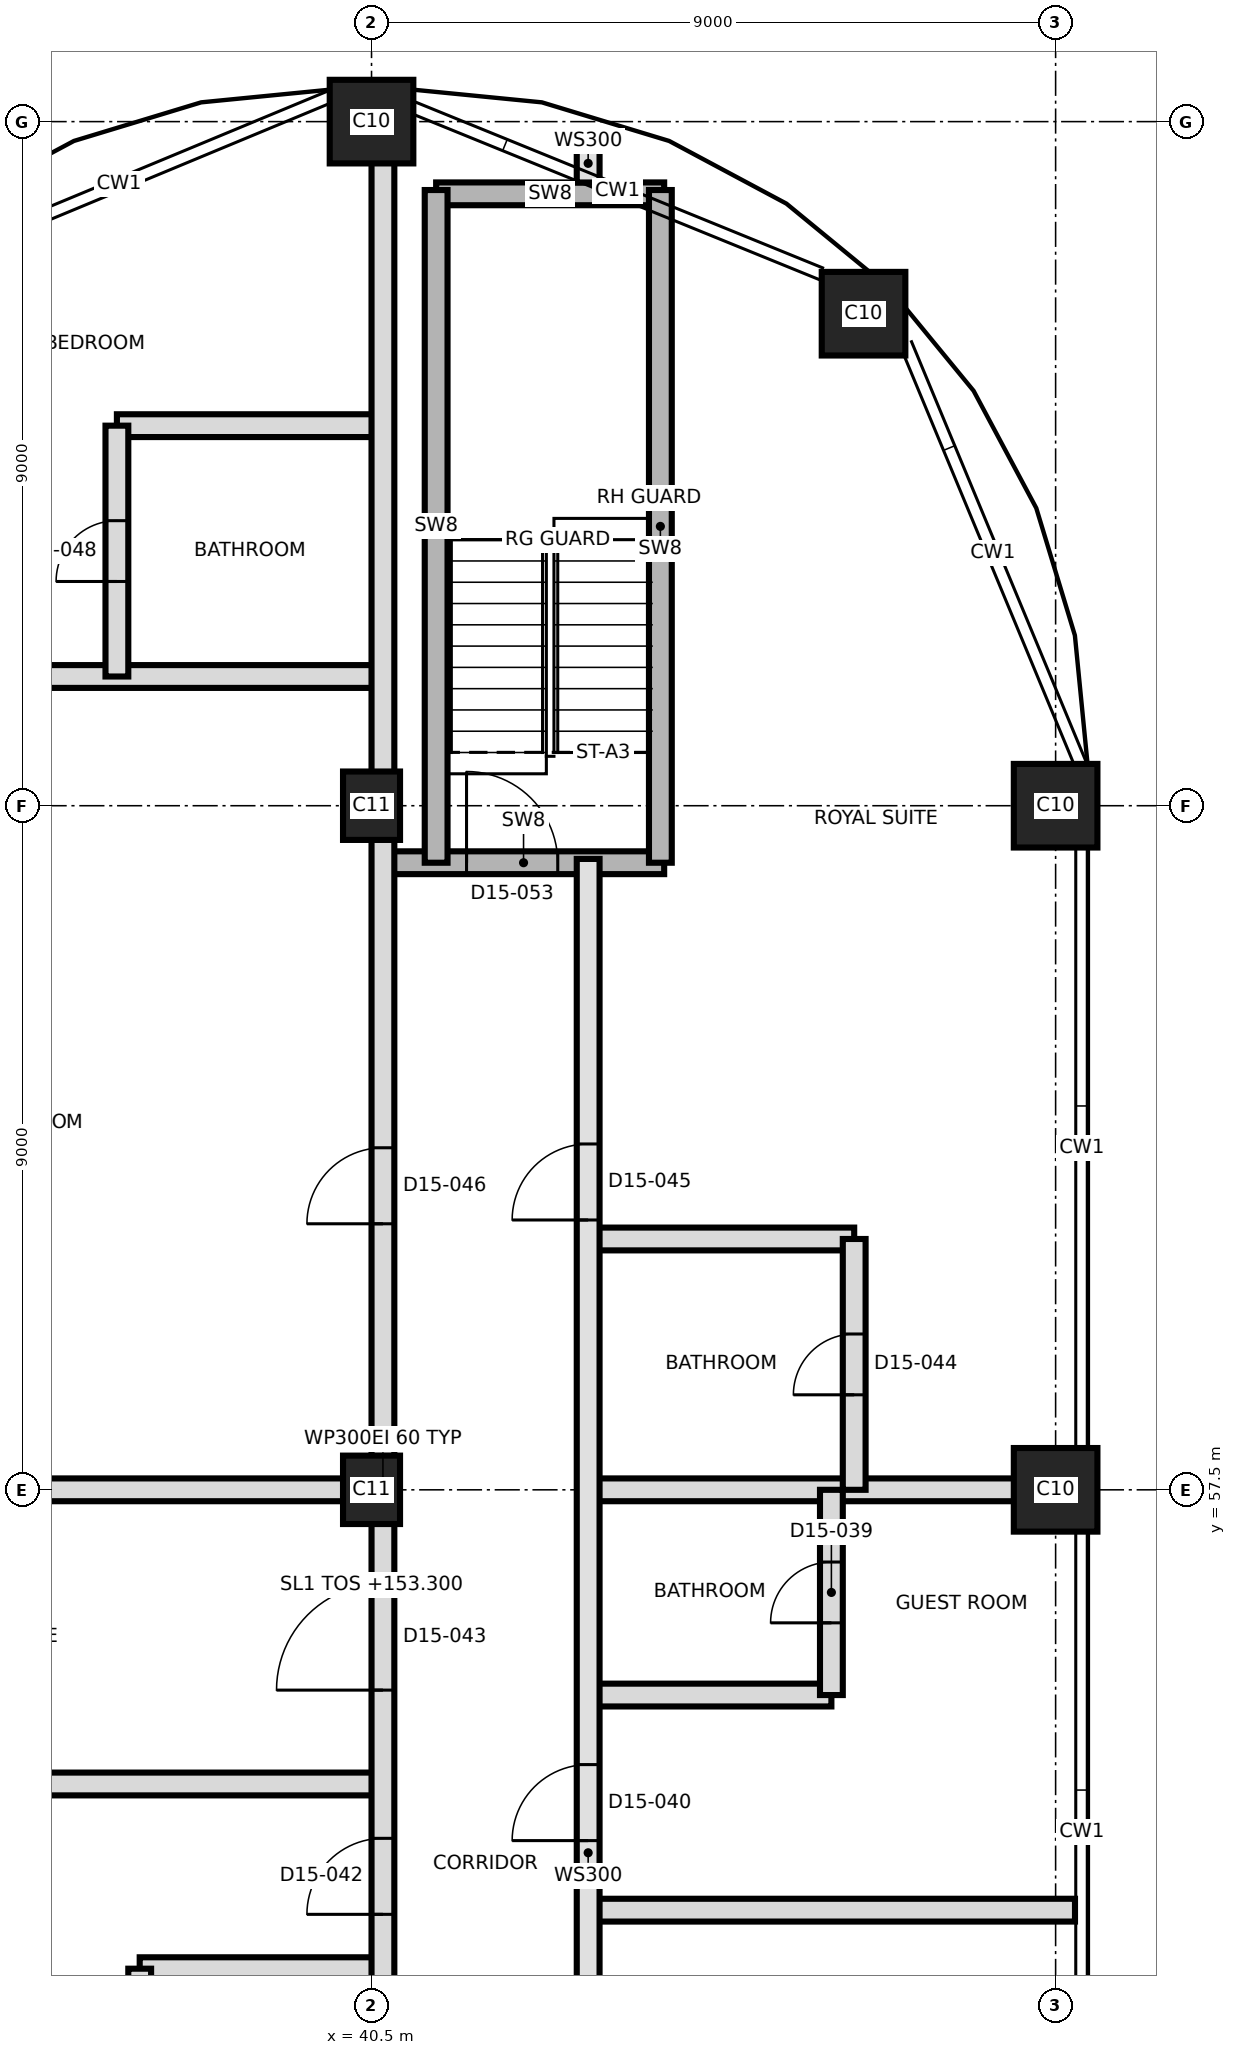
"""IFC4 building model, lengths in metres.
Left out: names, types, materials, properties, quantities, classifications, styles, units other than length and angle.
Written with IfcOpenShell. Run it as: python <this file> out.ifc"""

import sys

from ifc_helpers import new_model, si_unit, direction, frame, frame_2d, origin, origin_2d, place, context, subcontext, project, spatial, rectangle, extrude, element, fill, save


model = new_model("IFC4")
c1 = context("Model", 3, precision=1e-05, world=origin(), true_north=direction((0.0, 1.0)))
c2 = subcontext(c1, "Body", "Model", "MODEL_VIEW")
j1 = project(units=[si_unit("LENGTHUNIT", "METRE"), si_unit("PLANEANGLEUNIT", "RADIAN")], contexts=[c1])
p1 = place(None, origin())
s1 = spatial("IfcSite", under=j1, at=p1, CompositionType="ELEMENT")
p2 = place(p1, origin())
s2 = spatial("IfcBuilding", under=s1, at=p2, CompositionType="ELEMENT")
p3 = place(p2, frame((0.0, 0.0, 153.3)))
s3 = spatial("IfcBuildingStorey", under=s2, at=p3, CompositionType="ELEMENT", Elevation=153.3)
p4 = place(p3, frame((40.5, 57.5, 0.0), z_axis=(0.0, 0.0, 1.0), x_axis=(0.0, 1.0, 0.0)))
e1 = element("IfcColumn", 1, at=p4, inside=s3, PredefinedType="COLUMN", context=c2, shape_type="SweptSolid", body=[
    extrude(rectangle(XDim=0.9, YDim=0.75, at=origin_2d()), origin(), (0.0, 0.0, 1.0), 3.7),
])
p5 = place(p3, frame((49.5, 57.5, 0.0), z_axis=(0.0, 0.0, 1.0), x_axis=(1.0, 0.0, 0.0)))
e2 = element("IfcColumn", 2, at=p5, inside=s3, PredefinedType="COLUMN", context=c2, shape_type="SweptSolid", body=[
    extrude(rectangle(XDim=1.1, YDim=1.1, at=origin_2d()), origin(), (0.0, 0.0, 1.0), 3.7),
])
p6 = place(p3, frame((40.5, 66.5, 0.0), z_axis=(0.0, 0.0, 1.0), x_axis=(0.0, 1.0, 0.0)))
e3 = element("IfcColumn", 3, at=p6, inside=s3, PredefinedType="COLUMN", context=c2, shape_type="SweptSolid", body=[
    extrude(rectangle(XDim=0.9, YDim=0.75, at=origin_2d()), origin(), (0.0, 0.0, 1.0), 3.7),
])
for number, where, z_axis, x_axis in (
    (4, (49.5, 66.5, 0.0), (0.0, 0.0, 1.0), (1.0, 0.0, 0.0)),
    (5, (46.973, 72.973, 0.0), (0.0, 0.0, 1.0), (1.0, 0.0, 0.0)),
    (6, (40.5, 75.5, 0.0), (0.0, 0.0, 1.0), (1.0, 0.0, 0.0)),
):
    element("IfcColumn", number, at=place(p3, frame(where, z_axis=z_axis, x_axis=x_axis)), inside=s3, PredefinedType="COLUMN", context=c2, shape_type="SweptSolid", body=[
        extrude(rectangle(XDim=1.1, YDim=1.1, at=origin_2d()), origin(), (0.0, 0.0, 1.0), 3.7),
    ])
p7 = place(p3, frame((37.45, 51.2, 0.0), z_axis=(0.0, 0.0, 1.0), x_axis=(1.0, 0.0, 0.0)))
e7 = element("IfcWall", 7, at=p7, inside=s3, PredefinedType="PARTITIONING", context=c2, shape_type="SweptSolid", body=[
    extrude(rectangle(XDim=3.2, YDim=0.3, at=frame_2d((1.6, 0.0))), origin(), (0.0, 0.0, 1.0), 3.4),
])
p8 = place(p3, frame((43.35, 51.97, 0.0), z_axis=(0.0, 0.0, 1.0), x_axis=(1.0, 0.0, 0.0)))
e8 = element("IfcWall", 8, at=p8, inside=s3, PredefinedType="PARTITIONING", context=c2, shape_type="SweptSolid", body=[
    extrude(rectangle(XDim=6.405, YDim=0.3, at=frame_2d((3.202, 0.0))), origin(), (0.0, 0.0, 1.0), 3.4),
])
p9 = place(p3, frame((31.425, 53.63, 0.0), z_axis=(0.0, 0.0, 1.0), x_axis=(1.0, 0.0, 0.0)))
e9 = element("IfcWall", 9, at=p9, inside=s3, PredefinedType="PARTITIONING", context=c2, shape_type="SweptSolid", body=[
    extrude(rectangle(XDim=9.225, YDim=0.3, at=frame_2d((4.612, 0.0))), origin(), (0.0, 0.0, 1.0), 3.4),
])
p10 = place(p3, frame((43.35, 54.8, 0.0), z_axis=(0.0, 0.0, 1.0), x_axis=(1.0, 0.0, 0.0)))
e10 = element("IfcWall", 10, at=p10, inside=s3, PredefinedType="PARTITIONING", context=c2, shape_type="SweptSolid", body=[
    extrude(rectangle(XDim=3.2, YDim=0.3, at=frame_2d((1.6, 0.0))), origin(), (0.0, 0.0, 1.0), 3.4),
])
p11 = place(p3, frame((31.425, 57.5, 0.0), z_axis=(0.0, 0.0, 1.0), x_axis=(1.0, 0.0, 0.0)))
e11 = element("IfcWall", 11, at=p11, inside=s3, PredefinedType="PARTITIONING", context=c2, shape_type="SweptSolid", body=[
    extrude(rectangle(XDim=9.225, YDim=0.3, at=frame_2d((4.612, 0.0))), origin(), (0.0, 0.0, 1.0), 3.4),
])
p12 = place(p3, frame((43.35, 57.5, 0.0), z_axis=(0.0, 0.0, 1.0), x_axis=(1.0, 0.0, 0.0)))
e12 = element("IfcWall", 12, at=p12, inside=s3, PredefinedType="PARTITIONING", context=c2, shape_type="SweptSolid", body=[
    extrude(rectangle(XDim=6.225, YDim=0.3, at=frame_2d((3.112, 0.0))), origin(), (0.0, 0.0, 1.0), 3.4),
])
p13 = place(p3, frame((43.35, 60.8, 0.0), z_axis=(0.0, 0.0, 1.0), x_axis=(1.0, 0.0, 0.0)))
e13 = element("IfcWall", 13, at=p13, inside=s3, PredefinedType="PARTITIONING", context=c2, shape_type="SweptSolid", body=[
    extrude(rectangle(XDim=3.5, YDim=0.3, at=frame_2d((1.75, 0.0))), origin(), (0.0, 0.0, 1.0), 3.4),
])
p14 = place(p3, frame((40.65, 65.75, 0.0), z_axis=(0.0, 0.0, 1.0), x_axis=(1.0, 0.0, 0.0)))
e14 = element("IfcWall", 14, at=p14, inside=s3, PredefinedType="SHEAR", context=c2, shape_type="SweptSolid", body=[
    extrude(rectangle(XDim=3.7, YDim=0.3, at=frame_2d((1.85, 0.0))), origin(), (0.0, 0.0, 1.0), 3.4),
])
p15 = place(p14, frame((1.1, 0.0, 0.0)))
e15 = element("IfcOpeningElement", 15, at=p15, cuts=e14, PredefinedType="OPENING", context=c2, shape_type="SweptSolid", body=[
    extrude(rectangle(XDim=1.2, YDim=2.1, at=frame_2d((0.6, 1.05))), frame((0.0, 0.16, 0.0), z_axis=(0.0, -1.0, 0.0), x_axis=(1.0, 0.0, 0.0)), (0.0, 0.0, 1.0), 0.32),
])
p16 = place(p3, frame((31.304, 68.2, 0.0), z_axis=(0.0, 0.0, 1.0), x_axis=(1.0, 0.0, 0.0)))
e16 = element("IfcWall", 16, at=p16, inside=s3, PredefinedType="PARTITIONING", context=c2, shape_type="SweptSolid", body=[
    extrude(rectangle(XDim=9.346, YDim=0.3, at=frame_2d((4.673, 0.0))), origin(), (0.0, 0.0, 1.0), 3.4),
])
p17 = place(p16, frame((3.696, 0.0, 0.0)))
e17 = element("IfcOpeningElement", 17, at=p17, cuts=e16, PredefinedType="OPENING", context=c2, shape_type="SweptSolid", body=[
    extrude(rectangle(XDim=1.0, YDim=2.1, at=frame_2d((0.5, 1.05))), frame((0.0, 0.16, 0.0), z_axis=(0.0, -1.0, 0.0), x_axis=(1.0, 0.0, 0.0)), (0.0, 0.0, 1.0), 0.32),
])
p18 = place(p3, frame((37.15, 71.5, 0.0), z_axis=(0.0, 0.0, 1.0), x_axis=(1.0, 0.0, 0.0)))
e18 = element("IfcWall", 18, at=p18, inside=s3, PredefinedType="PARTITIONING", context=c2, shape_type="SweptSolid", body=[
    extrude(rectangle(XDim=3.5, YDim=0.3, at=frame_2d((1.75, 0.0))), origin(), (0.0, 0.0, 1.0), 3.4),
])
p19 = place(p3, frame((41.35, 74.55, 0.0), z_axis=(0.0, 0.0, 1.0), x_axis=(1.0, 0.0, 0.0)))
e19 = element("IfcWall", 19, at=p19, inside=s3, PredefinedType="SHEAR", context=c2, shape_type="SweptSolid", body=[
    extrude(rectangle(XDim=3.0, YDim=0.3, at=frame_2d((1.5, 0.0))), origin(), (0.0, 0.0, 1.0), 3.4),
])
p20 = place(p3, frame((37.15, 68.2, 0.0), z_axis=(0.0, 0.0, 1.0), x_axis=(0.0, 1.0, 0.0)))
e20 = element("IfcWall", 20, at=p20, inside=s3, PredefinedType="PARTITIONING", context=c2, shape_type="SweptSolid", body=[
    extrude(rectangle(XDim=3.3, YDim=0.3, at=frame_2d((1.65, 0.0))), origin(), (0.0, 0.0, 1.0), 3.4),
])
p21 = place(p20, frame((1.25, 0.0, 0.0)))
e21 = element("IfcOpeningElement", 21, at=p21, cuts=e20, PredefinedType="OPENING", context=c2, shape_type="SweptSolid", body=[
    extrude(rectangle(XDim=0.8, YDim=2.1, at=frame_2d((0.4, 1.05))), frame((0.0, 0.16, 0.0), z_axis=(0.0, -1.0, 0.0), x_axis=(1.0, 0.0, 0.0)), (0.0, 0.0, 1.0), 0.32),
])
p22 = place(p3, frame((37.45, 45.8, 0.0), z_axis=(0.0, 0.0, 1.0), x_axis=(0.0, 1.0, 0.0)))
e22 = element("IfcWall", 22, at=p22, inside=s3, PredefinedType="PARTITIONING", context=c2, shape_type="SweptSolid", body=[
    extrude(rectangle(XDim=5.4, YDim=0.3, at=frame_2d((2.7, 0.0))), origin(), (0.0, 0.0, 1.0), 3.4),
])
p23 = place(p22, frame((0.95, 0.0, 0.0)))
e23 = element("IfcOpeningElement", 23, at=p23, cuts=e22, PredefinedType="OPENING", context=c2, shape_type="SweptSolid", body=[
    extrude(rectangle(XDim=0.8, YDim=2.1, at=frame_2d((0.4, 1.05))), frame((0.0, 0.16, 0.0), z_axis=(0.0, -1.0, 0.0), x_axis=(1.0, 0.0, 0.0)), (0.0, 0.0, 1.0), 0.32),
])
p24 = place(p22, frame((3.65, 0.0, 0.0)))
e24 = element("IfcOpeningElement", 24, at=p24, cuts=e22, PredefinedType="OPENING", context=c2, shape_type="SweptSolid", body=[
    extrude(rectangle(XDim=0.8, YDim=2.1, at=frame_2d((0.4, 1.05))), frame((0.0, 0.16, 0.0), z_axis=(0.0, -1.0, 0.0), x_axis=(1.0, 0.0, 0.0)), (0.0, 0.0, 1.0), 0.32),
])
p25 = place(p3, frame((40.65, 39.65, 0.0), z_axis=(0.0, 0.0, 1.0), x_axis=(0.0, 1.0, 0.0)))
e25 = element("IfcWall", 25, at=p25, inside=s3, PredefinedType="PARTITIONING", context=c2, shape_type="SweptSolid", body=[
    extrude(rectangle(XDim=35.925, YDim=0.3, at=frame_2d((17.962, 0.0))), origin(), (0.0, 0.0, 1.0), 3.4),
])
p26 = place(p25, frame((1.55, 0.0, 0.0)))
e26 = element("IfcOpeningElement", 26, at=p26, cuts=e25, PredefinedType="OPENING", context=c2, shape_type="SweptSolid", body=[
    extrude(rectangle(XDim=1.2, YDim=2.1, at=frame_2d((0.6, 1.05))), frame((0.0, 0.16, 0.0), z_axis=(0.0, -1.0, 0.0), x_axis=(1.0, 0.0, 0.0)), (0.0, 0.0, 1.0), 0.32),
])
p27 = place(p25, frame((4.8, 0.0, 0.0)))
e27 = element("IfcOpeningElement", 27, at=p27, cuts=e25, PredefinedType="OPENING", context=c2, shape_type="SweptSolid", body=[
    extrude(rectangle(XDim=1.0, YDim=2.1, at=frame_2d((0.5, 1.05))), frame((0.0, 0.16, 0.0), z_axis=(0.0, -1.0, 0.0), x_axis=(1.0, 0.0, 0.0)), (0.0, 0.0, 1.0), 0.32),
])
p28 = place(p25, frame((12.265, 0.0, 0.0)))
e28 = element("IfcOpeningElement", 28, at=p28, cuts=e25, PredefinedType="OPENING", context=c2, shape_type="SweptSolid", body=[
    extrude(rectangle(XDim=1.0, YDim=2.1, at=frame_2d((0.5, 1.05))), frame((0.0, 0.16, 0.0), z_axis=(0.0, -1.0, 0.0), x_axis=(1.0, 0.0, 0.0)), (0.0, 0.0, 1.0), 0.32),
])
p29 = place(p25, frame((15.215, 0.0, 0.0)))
e29 = element("IfcOpeningElement", 29, at=p29, cuts=e25, PredefinedType="OPENING", context=c2, shape_type="SweptSolid", body=[
    extrude(rectangle(XDim=1.4, YDim=2.1, at=frame_2d((0.7, 1.05))), frame((0.0, 0.16, 0.0), z_axis=(0.0, -1.0, 0.0), x_axis=(1.0, 0.0, 0.0)), (0.0, 0.0, 1.0), 0.32),
])
p30 = place(p25, frame((21.35, 0.0, 0.0)))
e30 = element("IfcOpeningElement", 30, at=p30, cuts=e25, PredefinedType="OPENING", context=c2, shape_type="SweptSolid", body=[
    extrude(rectangle(XDim=1.0, YDim=2.4, at=frame_2d((0.5, 1.2))), frame((0.0, 0.16, 0.0), z_axis=(0.0, -1.0, 0.0), x_axis=(1.0, 0.0, 0.0)), (0.0, 0.0, 1.0), 0.32),
])
p31 = place(p3, frame((41.35, 65.75, 0.0), z_axis=(0.0, 0.0, 1.0), x_axis=(0.0, 1.0, 0.0)))
e31 = element("IfcWall", 31, at=p31, inside=s3, PredefinedType="SHEAR", context=c2, shape_type="SweptSolid", body=[
    extrude(rectangle(XDim=8.85, YDim=0.3, at=frame_2d((4.425, 0.0))), origin(), (0.0, 0.0, 1.0), 3.4),
])
p32 = place(p3, frame((43.35, 39.65, 0.0), z_axis=(0.0, 0.0, 1.0), x_axis=(0.0, 1.0, 0.0)))
e32 = element("IfcWall", 32, at=p32, inside=s3, PredefinedType="SOLIDWALL", context=c2, shape_type="SweptSolid", body=[
    extrude(rectangle(XDim=26.15, YDim=0.3, at=frame_2d((13.075, 0.0))), origin(), (0.0, 0.0, 1.0), 3.4),
])
p33 = place(p32, frame((3.1, 0.0, 0.0)))
e33 = element("IfcOpeningElement", 33, at=p33, cuts=e32, PredefinedType="OPENING", context=c2, shape_type="SweptSolid", body=[
    extrude(rectangle(XDim=1.0, YDim=2.1, at=frame_2d((0.5, 1.05))), frame((0.0, 0.16, 0.0), z_axis=(0.0, -1.0, 0.0), x_axis=(1.0, 0.0, 0.0)), (0.0, 0.0, 1.0), 0.32),
])
p34 = place(p32, frame((4.75, 0.0, 0.0)))
e34 = element("IfcOpeningElement", 34, at=p34, cuts=e32, PredefinedType="OPENING", context=c2, shape_type="SweptSolid", body=[
    extrude(rectangle(XDim=1.0, YDim=2.1, at=frame_2d((0.5, 1.05))), frame((0.0, 0.16, 0.0), z_axis=(0.0, -1.0, 0.0), x_axis=(1.0, 0.0, 0.0)), (0.0, 0.0, 1.0), 0.32),
])
p35 = place(p32, frame((9.985, 0.0, 0.0)))
e35 = element("IfcOpeningElement", 35, at=p35, cuts=e32, PredefinedType="OPENING", context=c2, shape_type="SweptSolid", body=[
    extrude(rectangle(XDim=1.2, YDim=2.1, at=frame_2d((0.6, 1.05))), frame((0.0, 0.16, 0.0), z_axis=(0.0, -1.0, 0.0), x_axis=(1.0, 0.0, 0.0)), (0.0, 0.0, 1.0), 0.32),
])
p36 = place(p32, frame((13.235, 0.0, 0.0)))
e36 = element("IfcOpeningElement", 36, at=p36, cuts=e32, PredefinedType="OPENING", context=c2, shape_type="SweptSolid", body=[
    extrude(rectangle(XDim=1.0, YDim=2.1, at=frame_2d((0.5, 1.05))), frame((0.0, 0.16, 0.0), z_axis=(0.0, -1.0, 0.0), x_axis=(1.0, 0.0, 0.0)), (0.0, 0.0, 1.0), 0.32),
])
p37 = place(p32, frame((21.4, 0.0, 0.0)))
e37 = element("IfcOpeningElement", 37, at=p37, cuts=e32, PredefinedType="OPENING", context=c2, shape_type="SweptSolid", body=[
    extrude(rectangle(XDim=1.0, YDim=2.4, at=frame_2d((0.5, 1.2))), frame((0.0, 0.16, 0.0), z_axis=(0.0, -1.0, 0.0), x_axis=(1.0, 0.0, 0.0)), (0.0, 0.0, 1.0), 0.32),
])
p38 = place(p3, frame((43.35, 74.699, 0.0), z_axis=(0.0, 0.0, 1.0), x_axis=(0.0, 1.0, 0.0)))
e38 = element("IfcWall", 38, at=p38, inside=s3, PredefinedType="SOLIDWALL", context=c2, shape_type="SweptSolid", body=[
    extrude(rectangle(XDim=0.504, YDim=0.3, at=frame_2d((0.252, 0.0))), origin(), (0.0, 0.0, 1.0), 3.4),
])
p39 = place(p3, frame((44.3, 65.75, 0.0), z_axis=(0.0, 0.0, 1.0), x_axis=(0.0, 1.0, 0.0)))
e39 = element("IfcWall", 39, at=p39, inside=s3, PredefinedType="SHEAR", context=c2, shape_type="SweptSolid", body=[
    extrude(rectangle(XDim=8.85, YDim=0.3, at=frame_2d((4.425, 0.0))), origin(), (0.0, 0.0, 1.0), 3.4),
])
p40 = place(p3, frame((46.55, 54.8, 0.0), z_axis=(0.0, 0.0, 1.0), x_axis=(0.0, 1.0, 0.0)))
e40 = element("IfcWall", 40, at=p40, inside=s3, PredefinedType="PARTITIONING", context=c2, shape_type="SweptSolid", body=[
    extrude(rectangle(XDim=2.7, YDim=0.3, at=frame_2d((1.35, 0.0))), origin(), (0.0, 0.0, 1.0), 3.4),
])
p41 = place(p40, frame((0.95, 0.0, 0.0)))
e41 = element("IfcOpeningElement", 41, at=p41, cuts=e40, PredefinedType="OPENING", context=c2, shape_type="SweptSolid", body=[
    extrude(rectangle(XDim=0.8, YDim=2.1, at=frame_2d((0.4, 1.05))), frame((0.0, 0.16, 0.0), z_axis=(0.0, -1.0, 0.0), x_axis=(1.0, 0.0, 0.0)), (0.0, 0.0, 1.0), 0.32),
])
p42 = place(p3, frame((46.85, 57.5, 0.0), z_axis=(0.0, 0.0, 1.0), x_axis=(0.0, 1.0, 0.0)))
e42 = element("IfcWall", 42, at=p42, inside=s3, PredefinedType="PARTITIONING", context=c2, shape_type="SweptSolid", body=[
    extrude(rectangle(XDim=3.3, YDim=0.3, at=frame_2d((1.65, 0.0))), origin(), (0.0, 0.0, 1.0), 3.4),
])
p43 = place(p42, frame((1.25, 0.0, 0.0)))
e43 = element("IfcOpeningElement", 43, at=p43, cuts=e42, PredefinedType="OPENING", context=c2, shape_type="SweptSolid", body=[
    extrude(rectangle(XDim=0.8, YDim=2.1, at=frame_2d((0.4, 1.05))), frame((0.0, 0.16, 0.0), z_axis=(0.0, -1.0, 0.0), x_axis=(1.0, 0.0, 0.0)), (0.0, 0.0, 1.0), 0.32),
])
p44 = place(p41, origin())
e44 = element("IfcDoor", 44, at=p44, inside=s3, OperationType="SINGLE_SWING_RIGHT", PredefinedType="DOOR", context=c2, shape_type="SweptSolid", body=[
    extrude(rectangle(XDim=0.8, YDim=2.1, at=frame_2d((0.4, 1.05))), frame((0.0, 0.025, 0.0), z_axis=(0.0, -1.0, 0.0), x_axis=(1.0, 0.0, 0.0)), (0.0, 0.0, 1.0), 0.05),
])
fill(e41, e44)
p45 = place(p36, origin())
e45 = element("IfcDoor", 45, at=p45, inside=s3, OperationType="SINGLE_SWING_LEFT", PredefinedType="DOOR", context=c2, shape_type="SweptSolid", body=[
    extrude(rectangle(XDim=1.0, YDim=2.1, at=frame_2d((0.5, 1.05))), frame((0.0, 0.025, 0.0), z_axis=(0.0, -1.0, 0.0), x_axis=(1.0, 0.0, 0.0)), (0.0, 0.0, 1.0), 0.05),
])
fill(e36, e45)
p46 = place(p28, origin())
e46 = element("IfcDoor", 46, at=p46, inside=s3, OperationType="SINGLE_SWING_LEFT", PredefinedType="DOOR", context=c2, shape_type="SweptSolid", body=[
    extrude(rectangle(XDim=1.0, YDim=2.1, at=frame_2d((0.5, 1.05))), frame((0.0, 0.025, 0.0), z_axis=(0.0, -1.0, 0.0), x_axis=(1.0, 0.0, 0.0)), (0.0, 0.0, 1.0), 0.05),
])
fill(e28, e46)
p47 = place(p29, origin())
e47 = element("IfcDoor", 47, at=p47, inside=s3, OperationType="SINGLE_SWING_RIGHT", PredefinedType="DOOR", context=c2, shape_type="SweptSolid", body=[
    extrude(rectangle(XDim=1.4, YDim=2.1, at=frame_2d((0.7, 1.05))), frame((0.0, 0.025, 0.0), z_axis=(0.0, -1.0, 0.0), x_axis=(1.0, 0.0, 0.0)), (0.0, 0.0, 1.0), 0.05),
])
fill(e29, e47)
p48 = place(p43, origin())
e48 = element("IfcDoor", 48, at=p48, inside=s3, OperationType="SINGLE_SWING_LEFT", PredefinedType="DOOR", context=c2, shape_type="SweptSolid", body=[
    extrude(rectangle(XDim=0.8, YDim=2.1, at=frame_2d((0.4, 1.05))), frame((0.0, 0.025, 0.0), z_axis=(0.0, -1.0, 0.0), x_axis=(1.0, 0.0, 0.0)), (0.0, 0.0, 1.0), 0.05),
])
fill(e43, e48)
p49 = place(p37, origin())
e49 = element("IfcDoor", 49, at=p49, inside=s3, OperationType="SINGLE_SWING_LEFT", PredefinedType="DOOR", context=c2, shape_type="SweptSolid", body=[
    extrude(rectangle(XDim=1.0, YDim=2.4, at=frame_2d((0.5, 1.2))), frame((0.0, 0.025, 0.0), z_axis=(0.0, -1.0, 0.0), x_axis=(1.0, 0.0, 0.0)), (0.0, 0.0, 1.0), 0.05),
])
fill(e37, e49)
p50 = place(p30, origin())
e50 = element("IfcDoor", 50, at=p50, inside=s3, OperationType="SINGLE_SWING_RIGHT", PredefinedType="DOOR", context=c2, shape_type="SweptSolid", body=[
    extrude(rectangle(XDim=1.0, YDim=2.4, at=frame_2d((0.5, 1.2))), frame((0.0, 0.025, 0.0), z_axis=(0.0, -1.0, 0.0), x_axis=(1.0, 0.0, 0.0)), (0.0, 0.0, 1.0), 0.05),
])
fill(e30, e50)
p51 = place(p21, origin())
e51 = element("IfcDoor", 51, at=p51, inside=s3, OperationType="SINGLE_SWING_LEFT", PredefinedType="DOOR", context=c2, shape_type="SweptSolid", body=[
    extrude(rectangle(XDim=0.8, YDim=2.1, at=frame_2d((0.4, 1.05))), frame((0.0, 0.025, 0.0), z_axis=(0.0, -1.0, 0.0), x_axis=(1.0, 0.0, 0.0)), (0.0, 0.0, 1.0), 0.05),
])
fill(e21, e51)
p52 = place(p15, origin())
e52 = element("IfcDoor", 52, at=p52, inside=s3, OperationType="SINGLE_SWING_RIGHT", PredefinedType="DOOR", context=c2, shape_type="SweptSolid", body=[
    extrude(rectangle(XDim=1.2, YDim=2.1, at=frame_2d((0.6, 1.05))), frame((0.0, 0.025, 0.0), z_axis=(0.0, -1.0, 0.0), x_axis=(1.0, 0.0, 0.0)), (0.0, 0.0, 1.0), 0.05),
])
fill(e15, e52)
save(model, sys.argv[1])
